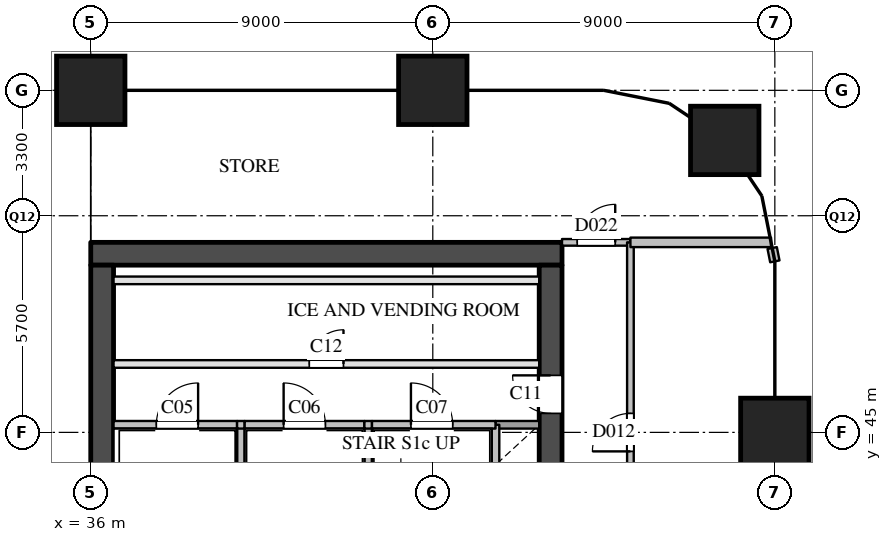
"""IFC4 building model, lengths in metres.
Left out: names, types, materials, properties, quantities, classifications, styles, units other than length and angle.
Written with IfcOpenShell. Run it as: python <this file> out.ifc"""

import sys

from ifc_helpers import new_model, si_unit, direction, frame, frame_2d, origin, origin_2d, place, context, subcontext, project, spatial, rectangle, extrude, element, fill, save


model = new_model("IFC4")
c1 = context("Model", 3, precision=1e-05, world=origin(), true_north=direction((0.0, 1.0)))
c2 = subcontext(c1, "Body", "Model", "MODEL_VIEW")
j1 = project(units=[si_unit("LENGTHUNIT", "METRE"), si_unit("PLANEANGLEUNIT", "RADIAN")], contexts=[c1])
p1 = place(None, origin())
s1 = spatial("IfcSite", under=j1, at=p1, CompositionType="ELEMENT")
p2 = place(p1, origin())
s2 = spatial("IfcBuilding", under=s1, at=p2, CompositionType="ELEMENT")
p3 = place(p2, frame((0.0, 0.0, 8.0)))
s3 = spatial("IfcBuildingStorey", under=s2, at=p3, CompositionType="ELEMENT", Elevation=8.0)
for number, where, z_axis, x_axis in (
    (1, (36.0, 54.0, 0.0), (0.0, 0.0, 1.0), (1.0, 0.0, 0.0)),
    (2, (45.0, 54.0, 0.0), (0.0, 0.0, 1.0), (1.0, 0.0, 0.0)),
    (3, (54.0, 45.0, 0.0), (0.0, 0.0, 1.0), (1.0, 0.0, 0.0)),
    (4, (52.682, 52.682, 0.0), (0.0, 0.0, 1.0), (1.0, 0.0, 0.0)),
):
    element("IfcColumn", number, at=place(p3, frame(where, z_axis=z_axis, x_axis=x_axis)), inside=s3, PredefinedType="COLUMN", context=c2, shape_type="SweptSolid", body=[
        extrude(rectangle(XDim=1.8, YDim=1.8, at=origin_2d()), origin(), (0.0, 0.0, 1.0), 6.0),
    ])
p4 = place(p3, frame((36.0, 49.7, 0.0), z_axis=(0.0, 0.0, 1.0), x_axis=(1.0, 0.0, 0.0)))
e5 = element("IfcWall", 5, at=p4, inside=s3, PredefinedType="SHEAR", context=c2, shape_type="SweptSolid", body=[
    extrude(rectangle(XDim=12.4, YDim=0.6, at=frame_2d((6.2, 0.0))), origin(), (0.0, 0.0, 1.0), 5.59),
])
p5 = place(p3, frame((36.3, 29.1, 0.0), z_axis=(0.0, 0.0, 1.0), x_axis=(0.0, 1.0, 0.0)))
e6 = element("IfcWall", 6, at=p5, inside=s3, PredefinedType="SHEAR", context=c2, shape_type="SweptSolid", body=[
    extrude(rectangle(XDim=20.3, YDim=0.6, at=frame_2d((10.15, 0.0))), origin(), (0.0, 0.0, 1.0), 5.59),
])
p6 = place(p3, frame((48.1, 29.1, 0.0), z_axis=(0.0, 0.0, 1.0), x_axis=(0.0, 1.0, 0.0)))
e7 = element("IfcWall", 7, at=p6, inside=s3, PredefinedType="SHEAR", context=c2, shape_type="SweptSolid", body=[
    extrude(rectangle(XDim=20.3, YDim=0.6, at=frame_2d((10.15, 0.0))), origin(), (0.0, 0.0, 1.0), 5.59),
])
p7 = place(p6, frame((12.5, 0.0, 0.0)))
e8 = element("IfcOpeningElement", 8, at=p7, cuts=e7, PredefinedType="OPENING", context=c2, shape_type="SweptSolid", body=[
    extrude(rectangle(XDim=0.7, YDim=2.1, at=frame_2d((0.35, 1.05))), frame((0.0, 0.31, 0.0), z_axis=(0.0, -1.0, 0.0), x_axis=(1.0, 0.0, 0.0)), (0.0, 0.0, 1.0), 0.62),
])
p8 = place(p6, frame((3.9, 0.0, 0.0)))
e9 = element("IfcOpeningElement", 9, at=p8, cuts=e7, PredefinedType="OPENING", context=c2, shape_type="SweptSolid", body=[
    extrude(rectangle(XDim=1.8, YDim=2.1, at=frame_2d((0.9, 1.05))), frame((0.0, 0.31, 0.0), z_axis=(0.0, -1.0, 0.0), x_axis=(1.0, 0.0, 0.0)), (0.0, 0.0, 1.0), 0.62),
])
p9 = place(p6, frame((16.4, 0.0, 0.0)))
e10 = element("IfcOpeningElement", 10, at=p9, cuts=e7, PredefinedType="OPENING", context=c2, shape_type="SweptSolid", body=[
    extrude(rectangle(XDim=1.0, YDim=2.1, at=frame_2d((0.5, 1.05))), frame((0.0, 0.31, 0.0), z_axis=(0.0, -1.0, 0.0), x_axis=(1.0, 0.0, 0.0)), (0.0, 0.0, 1.0), 0.62),
])
for number, where, z_axis, x_axis in (
    (11, (39.95, 43.58, 0.0), (0.0, 0.0, 1.0), (0.0, 1.0, 0.0)),
    (12, (43.3, 43.58, 0.0), (0.0, 0.0, 1.0), (0.0, 1.0, 0.0)),
    (13, (46.65, 43.58, 0.0), (0.0, 0.0, 1.0), (0.0, 1.0, 0.0)),
):
    element("IfcWall", number, at=place(p3, frame(where, z_axis=z_axis, x_axis=x_axis)), inside=s3, PredefinedType="SOLIDWALL", context=c2, shape_type="SweptSolid", body=[
        extrude(rectangle(XDim=1.62, YDim=0.2, at=frame_2d((0.81, 0.0))), origin(), (0.0, 0.0, 1.0), 5.59),
    ])
p10 = place(p3, frame((46.65, 45.2, 0.0), z_axis=(0.0, 0.0, 1.0), x_axis=(1.0, 0.0, 0.0)))
e14 = element("IfcWall", 14, at=p10, inside=s3, PredefinedType="SOLIDWALL", context=c2, shape_type="SweptSolid", body=[
    extrude(rectangle(XDim=1.15, YDim=0.2, at=frame_2d((0.575, 0.0))), origin(), (0.0, 0.0, 1.0), 5.59),
])
p11 = place(p3, frame((36.6, 45.2, 0.0), z_axis=(0.0, 0.0, 1.0), x_axis=(1.0, 0.0, 0.0)))
e15 = element("IfcWall", 15, at=p11, inside=s3, PredefinedType="SOLIDWALL", context=c2, shape_type="SweptSolid", body=[
    extrude(rectangle(XDim=3.25, YDim=0.2, at=frame_2d((1.625, 0.0))), origin(), (0.0, 0.0, 1.0), 5.59),
])
p12 = place(p11, frame((1.125, 0.0, 0.0)))
e16 = element("IfcOpeningElement", 16, at=p12, cuts=e15, PredefinedType="OPENING", context=c2, shape_type="SweptSolid", body=[
    extrude(rectangle(XDim=1.1, YDim=2.1, at=frame_2d((0.55, 1.05))), frame((0.0, 0.11, 0.0), z_axis=(0.0, -1.0, 0.0), x_axis=(1.0, 0.0, 0.0)), (0.0, 0.0, 1.0), 0.22),
])
p13 = place(p3, frame((39.85, 45.2, 0.0), z_axis=(0.0, 0.0, 1.0), x_axis=(1.0, 0.0, 0.0)))
e17 = element("IfcWall", 17, at=p13, inside=s3, PredefinedType="SOLIDWALL", context=c2, shape_type="SweptSolid", body=[
    extrude(rectangle(XDim=0.2, YDim=0.2, at=frame_2d((0.1, 0.0))), origin(), (0.0, 0.0, 1.0), 5.59),
])
p14 = place(p3, frame((40.05, 45.2, 0.0), z_axis=(0.0, 0.0, 1.0), x_axis=(1.0, 0.0, 0.0)))
e18 = element("IfcWall", 18, at=p14, inside=s3, PredefinedType="SOLIDWALL", context=c2, shape_type="SweptSolid", body=[
    extrude(rectangle(XDim=3.15, YDim=0.2, at=frame_2d((1.575, 0.0))), origin(), (0.0, 0.0, 1.0), 5.59),
])
p15 = place(p14, frame((1.025, 0.0, 0.0)))
e19 = element("IfcOpeningElement", 19, at=p15, cuts=e18, PredefinedType="OPENING", context=c2, shape_type="SweptSolid", body=[
    extrude(rectangle(XDim=1.1, YDim=2.1, at=frame_2d((0.55, 1.05))), frame((0.0, 0.11, 0.0), z_axis=(0.0, -1.0, 0.0), x_axis=(1.0, 0.0, 0.0)), (0.0, 0.0, 1.0), 0.22),
])
p16 = place(p3, frame((43.2, 45.2, 0.0), z_axis=(0.0, 0.0, 1.0), x_axis=(1.0, 0.0, 0.0)))
e20 = element("IfcWall", 20, at=p16, inside=s3, PredefinedType="SOLIDWALL", context=c2, shape_type="SweptSolid", body=[
    extrude(rectangle(XDim=0.2, YDim=0.2, at=frame_2d((0.1, 0.0))), origin(), (0.0, 0.0, 1.0), 5.59),
])
p17 = place(p3, frame((43.4, 45.2, 0.0), z_axis=(0.0, 0.0, 1.0), x_axis=(1.0, 0.0, 0.0)))
e21 = element("IfcWall", 21, at=p17, inside=s3, PredefinedType="SOLIDWALL", context=c2, shape_type="SweptSolid", body=[
    extrude(rectangle(XDim=3.25, YDim=0.2, at=frame_2d((1.625, 0.0))), origin(), (0.0, 0.0, 1.0), 5.59),
])
p18 = place(p17, frame((1.025, 0.0, 0.0)))
e22 = element("IfcOpeningElement", 22, at=p18, cuts=e21, PredefinedType="OPENING", context=c2, shape_type="SweptSolid", body=[
    extrude(rectangle(XDim=1.1, YDim=2.1, at=frame_2d((0.55, 1.05))), frame((0.0, 0.11, 0.0), z_axis=(0.0, -1.0, 0.0), x_axis=(1.0, 0.0, 0.0)), (0.0, 0.0, 1.0), 0.22),
])
p19 = place(p3, frame((36.6, 46.8, 0.0), z_axis=(0.0, 0.0, 1.0), x_axis=(1.0, 0.0, 0.0)))
e23 = element("IfcWall", 23, at=p19, inside=s3, PredefinedType="PARTITIONING", context=c2, shape_type="SweptSolid", body=[
    extrude(rectangle(XDim=11.2, YDim=0.2, at=frame_2d((5.6, 0.0))), origin(), (0.0, 0.0, 1.0), 5.59),
])
p20 = place(p19, frame((5.15, 0.0, 0.0)))
e24 = element("IfcOpeningElement", 24, at=p20, cuts=e23, PredefinedType="OPENING", context=c2, shape_type="SweptSolid", body=[
    extrude(rectangle(XDim=0.9, YDim=2.1, at=frame_2d((0.45, 1.05))), frame((0.0, 0.11, 0.0), z_axis=(0.0, -1.0, 0.0), x_axis=(1.0, 0.0, 0.0)), (0.0, 0.0, 1.0), 0.22),
])
p21 = place(p3, frame((36.6, 49.0, 0.0), z_axis=(0.0, 0.0, 1.0), x_axis=(1.0, 0.0, 0.0)))
e25 = element("IfcWall", 25, at=p21, inside=s3, PredefinedType="PARTITIONING", context=c2, shape_type="SweptSolid", body=[
    extrude(rectangle(XDim=11.2, YDim=0.2, at=frame_2d((5.6, 0.0))), origin(), (0.0, 0.0, 1.0), 5.59),
])
p22 = place(p3, frame((48.4, 50.0, 0.0), z_axis=(0.0, 0.0, 1.0), x_axis=(1.0, 0.0, 0.0)))
e26 = element("IfcWall", 26, at=p22, inside=s3, PredefinedType="PARTITIONING", context=c2, shape_type="SweptSolid", body=[
    extrude(rectangle(XDim=1.8, YDim=0.175, at=frame_2d((0.9, 0.0))), origin(), (0.0, 0.0, 1.0), 5.59),
])
p23 = place(p22, frame((0.4, 0.0, 0.0)))
e27 = element("IfcOpeningElement", 27, at=p23, cuts=e26, PredefinedType="OPENING", context=c2, shape_type="SweptSolid", body=[
    extrude(rectangle(XDim=1.0, YDim=2.1, at=frame_2d((0.5, 1.05))), frame((0.0, 0.097, 0.0), z_axis=(0.0, -1.0, 0.0), x_axis=(1.0, 0.0, 0.0)), (0.0, 0.0, 1.0), 0.195),
])
p24 = place(p3, frame((50.2, 28.5, 0.0), z_axis=(0.0, 0.0, 1.0), x_axis=(0.0, 1.0, 0.0)))
e28 = element("IfcWall", 28, at=p24, inside=s3, PredefinedType="PARTITIONING", context=c2, shape_type="SweptSolid", body=[
    extrude(rectangle(XDim=21.5, YDim=0.175, at=frame_2d((10.75, 0.0))), origin(), (0.0, 0.0, 1.0), 5.59),
])
p25 = place(p24, frame((5.25, 0.0, 0.0)))
e29 = element("IfcOpeningElement", 29, at=p25, cuts=e28, PredefinedType="OPENING", context=c2, shape_type="SweptSolid", body=[
    extrude(rectangle(XDim=1.0, YDim=2.1, at=frame_2d((0.5, 1.05))), frame((0.0, 0.097, 0.0), z_axis=(0.0, -1.0, 0.0), x_axis=(1.0, 0.0, 0.0)), (0.0, 0.0, 1.0), 0.195),
])
p26 = place(p24, frame((16.0, 0.0, 0.0)))
e30 = element("IfcOpeningElement", 30, at=p26, cuts=e28, PredefinedType="OPENING", context=c2, shape_type="SweptSolid", body=[
    extrude(rectangle(XDim=1.0, YDim=2.1, at=frame_2d((0.5, 1.05))), frame((0.0, 0.097, 0.0), z_axis=(0.0, -1.0, 0.0), x_axis=(1.0, 0.0, 0.0)), (0.0, 0.0, 1.0), 0.195),
])
p27 = place(p3, frame((50.2, 50.0, 0.0), z_axis=(0.0, 0.0, 1.0), x_axis=(1.0, 0.0, 0.0)))
e31 = element("IfcWall", 31, at=p27, inside=s3, PredefinedType="PARTITIONING", context=c2, shape_type="SweptSolid", body=[
    extrude(rectangle(XDim=3.7, YDim=0.25, at=frame_2d((1.85, 0.0))), origin(), (0.0, 0.0, 1.0), 4.59),
])
p28 = place(p3, frame((53.93, 49.851, 0.0), z_axis=(0.0, 0.0, 1.0), x_axis=(0.194670995803, -0.980868596395, 0.0)))
e32 = element("IfcWall", 32, at=p28, inside=s3, PredefinedType="PARTITIONING", context=c2, shape_type="SweptSolid", body=[
    extrude(rectangle(XDim=0.357, YDim=0.25, at=frame_2d((0.179, 0.0))), origin(), (0.0, 0.0, 1.0), 4.59),
])
p29 = place(p12, origin())
e33 = element("IfcDoor", 33, at=p29, inside=s3, OperationType="SINGLE_SWING_RIGHT", PredefinedType="DOOR", context=c2, shape_type="SweptSolid", body=[
    extrude(rectangle(XDim=1.1, YDim=2.1, at=frame_2d((0.55, 1.05))), frame((0.0, 0.025, 0.0), z_axis=(0.0, -1.0, 0.0), x_axis=(1.0, 0.0, 0.0)), (0.0, 0.0, 1.0), 0.05),
])
fill(e16, e33)
p30 = place(p15, origin())
e34 = element("IfcDoor", 34, at=p30, inside=s3, OperationType="SINGLE_SWING_LEFT", PredefinedType="DOOR", context=c2, shape_type="SweptSolid", body=[
    extrude(rectangle(XDim=1.1, YDim=2.1, at=frame_2d((0.55, 1.05))), frame((0.0, 0.025, 0.0), z_axis=(0.0, -1.0, 0.0), x_axis=(1.0, 0.0, 0.0)), (0.0, 0.0, 1.0), 0.05),
])
fill(e19, e34)
p31 = place(p18, origin())
e35 = element("IfcDoor", 35, at=p31, inside=s3, OperationType="SINGLE_SWING_LEFT", PredefinedType="DOOR", context=c2, shape_type="SweptSolid", body=[
    extrude(rectangle(XDim=1.1, YDim=2.1, at=frame_2d((0.55, 1.05))), frame((0.0, 0.025, 0.0), z_axis=(0.0, -1.0, 0.0), x_axis=(1.0, 0.0, 0.0)), (0.0, 0.0, 1.0), 0.05),
])
fill(e22, e35)
p32 = place(p9, origin())
e36 = element("IfcDoor", 36, at=p32, inside=s3, OperationType="SINGLE_SWING_RIGHT", PredefinedType="DOOR", context=c2, shape_type="SweptSolid", body=[
    extrude(rectangle(XDim=1.0, YDim=2.1, at=frame_2d((0.5, 1.05))), frame((0.0, 0.025, 0.0), z_axis=(0.0, -1.0, 0.0), x_axis=(1.0, 0.0, 0.0)), (0.0, 0.0, 1.0), 0.05),
])
fill(e10, e36)
p33 = place(p20, origin())
e37 = element("IfcDoor", 37, at=p33, inside=s3, OperationType="SINGLE_SWING_RIGHT", PredefinedType="DOOR", context=c2, shape_type="SweptSolid", body=[
    extrude(rectangle(XDim=0.9, YDim=2.1, at=frame_2d((0.45, 1.05))), frame((0.0, 0.025, 0.0), z_axis=(0.0, -1.0, 0.0), x_axis=(1.0, 0.0, 0.0)), (0.0, 0.0, 1.0), 0.05),
])
fill(e24, e37)
p34 = place(p26, origin())
e38 = element("IfcDoor", 38, at=p34, inside=s3, OperationType="SINGLE_SWING_LEFT", PredefinedType="DOOR", context=c2, shape_type="SweptSolid", body=[
    extrude(rectangle(XDim=1.0, YDim=2.1, at=frame_2d((0.5, 1.05))), frame((0.0, 0.025, 0.0), z_axis=(0.0, -1.0, 0.0), x_axis=(1.0, 0.0, 0.0)), (0.0, 0.0, 1.0), 0.05),
])
fill(e30, e38)
p35 = place(p23, origin())
e39 = element("IfcDoor", 39, at=p35, inside=s3, OperationType="SINGLE_SWING_RIGHT", PredefinedType="DOOR", context=c2, shape_type="SweptSolid", body=[
    extrude(rectangle(XDim=1.0, YDim=2.1, at=frame_2d((0.5, 1.05))), frame((0.0, 0.025, 0.0), z_axis=(0.0, -1.0, 0.0), x_axis=(1.0, 0.0, 0.0)), (0.0, 0.0, 1.0), 0.05),
])
fill(e27, e39)
save(model, sys.argv[1])
